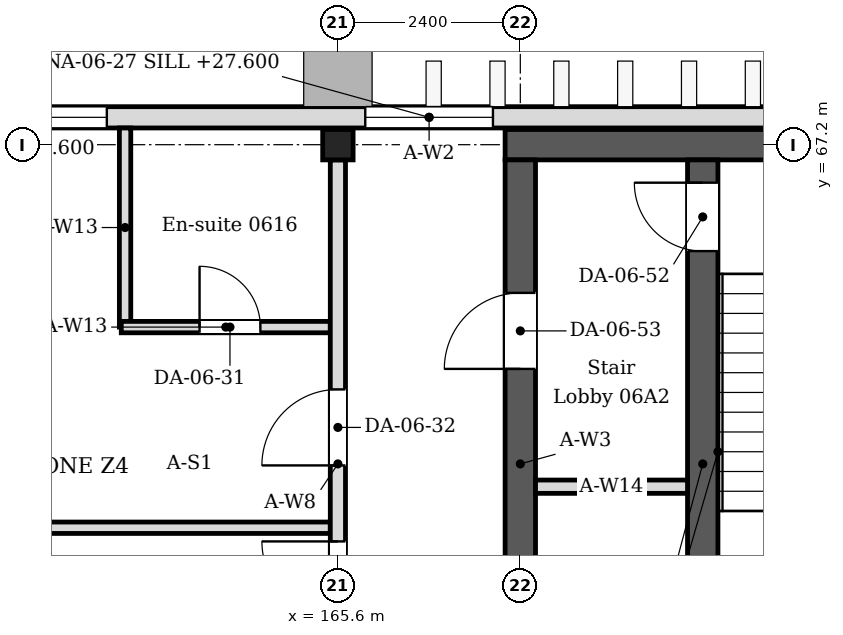
"""IFC4 building model, lengths in metres.
Left out: names, types, materials, properties, quantities, classifications, styles, units other than length and angle.
Written with IfcOpenShell. Run it as: python <this file> out.ifc"""

import sys

from ifc_helpers import new_model, si_unit, direction, frame, frame_2d, origin, origin_2d, place, context, subcontext, project, spatial, rectangle, i_section, extrude, element, fill, save


model = new_model("IFC4")
c1 = context("Model", 3, precision=1e-05, world=origin(), true_north=direction((0.0, 1.0)))
c2 = subcontext(c1, "Body", "Model", "MODEL_VIEW")
j1 = project(units=[si_unit("LENGTHUNIT", "METRE"), si_unit("PLANEANGLEUNIT", "RADIAN")], contexts=[c1])
p1 = place(None, origin())
s1 = spatial("IfcSite", under=j1, at=p1, CompositionType="ELEMENT")
p2 = place(p1, origin())
s2 = spatial("IfcBuilding", under=s1, at=p2, CompositionType="ELEMENT")
p3 = place(p2, frame((0.0, 0.0, 27.0)))
s3 = spatial("IfcBuildingStorey", under=s2, at=p3, CompositionType="ELEMENT", Elevation=27.0)
p4 = place(p3, frame((165.6, 67.2, 0.0), z_axis=(0.0, 0.0, 1.0), x_axis=(1.0, 0.0, 0.0)))
e1 = element("IfcColumn", 1, at=p4, inside=s3, PredefinedType="COLUMN", context=c2, shape_type="SweptSolid", body=[
    extrude(i_section(OverallWidth=0.4, OverallDepth=0.4, WebThickness=0.013, FlangeThickness=0.021, FilletRadius=0.022, at=origin_2d()), origin(), (0.0, 0.0, 1.0), 4.2),
])
p5 = place(p3, frame((167.8, 67.2, 0.0), z_axis=(0.0, 0.0, 1.0), x_axis=(1.0, 0.0, 0.0)))
e2 = element("IfcWall", 2, at=p5, inside=s3, PredefinedType="SOLIDWALL", context=c2, shape_type="SweptSolid", body=[
    extrude(rectangle(XDim=8.8, YDim=0.4, at=frame_2d((4.4, 0.0))), origin(), (0.0, 0.0, 1.0), 4.05),
])
p6 = place(p3, frame((168.0, 59.0, 0.0), z_axis=(0.0, 0.0, 1.0), x_axis=(0.0, 1.0, 0.0)))
e3 = element("IfcWall", 3, at=p6, inside=s3, PredefinedType="SOLIDWALL", context=c2, shape_type="SweptSolid", body=[
    extrude(rectangle(XDim=8.0, YDim=0.4, at=frame_2d((4.0, 0.0))), origin(), (0.0, 0.0, 1.0), 4.05),
])
p7 = place(p6, frame((5.25, 0.0, 0.0)))
e4 = element("IfcOpeningElement", 4, at=p7, cuts=e3, PredefinedType="OPENING", context=c2, shape_type="SweptSolid", body=[
    extrude(rectangle(XDim=1.0, YDim=2.1, at=frame_2d((0.5, 1.05))), frame((0.0, 0.21, 0.0), z_axis=(0.0, -1.0, 0.0), x_axis=(1.0, 0.0, 0.0)), (0.0, 0.0, 1.0), 0.42),
])
p8 = place(p6, frame((1.275, 0.0, 0.0)))
e5 = element("IfcOpeningElement", 5, at=p8, cuts=e3, PredefinedType="OPENING", context=c2, shape_type="SweptSolid", body=[
    extrude(rectangle(XDim=1.05, YDim=2.1, at=frame_2d((0.525, 1.05))), frame((0.0, 0.21, 0.0), z_axis=(0.0, -1.0, 0.0), x_axis=(1.0, 0.0, 0.0)), (0.0, 0.0, 1.0), 0.42),
])
p9 = place(p3, frame((156.7, 67.56, 0.0), z_axis=(0.0, 0.0, 1.0), x_axis=(1.0, 0.0, 0.0)))
e6 = element("IfcWall", 6, at=p9, inside=s3, PredefinedType="SOLIDWALL", context=c2, shape_type="SweptSolid", body=[
    extrude(rectangle(XDim=20.2, YDim=0.28, at=frame_2d((10.1, 0.0))), origin(), (0.0, 0.0, 1.0), 4.05),
])
p10 = place(p9, frame((9.26, 0.0, 0.6)))
e7 = element("IfcOpeningElement", 7, at=p10, cuts=e6, PredefinedType="OPENING", context=c2, shape_type="SweptSolid", body=[
    extrude(rectangle(XDim=1.68, YDim=2.4, at=frame_2d((0.84, 1.2))), frame((0.0, 0.15, 0.0), z_axis=(0.0, -1.0, 0.0), x_axis=(1.0, 0.0, 0.0)), (0.0, 0.0, 1.0), 0.3),
])
p11 = place(p9, frame((3.34, 0.0, 0.6)))
e8 = element("IfcOpeningElement", 8, at=p11, cuts=e6, PredefinedType="OPENING", context=c2, shape_type="SweptSolid", body=[
    extrude(rectangle(XDim=2.52, YDim=2.4, at=frame_2d((1.26, 1.2))), frame((0.0, 0.15, 0.0), z_axis=(0.0, -1.0, 0.0), x_axis=(1.0, 0.0, 0.0)), (0.0, 0.0, 1.0), 0.3),
])
p12 = place(p3, frame((162.8, 64.8, 0.0), z_axis=(0.0, 0.0, 1.0), x_axis=(0.0, 1.0, 0.0)))
e9 = element("IfcWall", 9, at=p12, inside=s3, PredefinedType="PARTITIONING", context=c2, shape_type="SweptSolid", body=[
    extrude(rectangle(XDim=2.62, YDim=0.15, at=frame_2d((1.31, 0.0))), origin(), (0.0, 0.0, 1.0), 4.05),
])
p13 = place(p3, frame((162.75, 64.8, 0.0), z_axis=(0.0, 0.0, 1.0), x_axis=(1.0, 0.0, 0.0)))
e10 = element("IfcWall", 10, at=p13, inside=s3, PredefinedType="PARTITIONING", context=c2, shape_type="SweptSolid", body=[
    extrude(rectangle(XDim=2.75, YDim=0.15, at=frame_2d((1.375, 0.0))), origin(), (0.0, 0.0, 1.0), 4.05),
])
p14 = place(p13, frame((1.03, 0.0, 0.0)))
e11 = element("IfcOpeningElement", 11, at=p14, cuts=e10, PredefinedType="OPENING", context=c2, shape_type="SweptSolid", body=[
    extrude(rectangle(XDim=0.8, YDim=2.1, at=frame_2d((0.4, 1.05))), frame((0.0, 0.085, 0.0), z_axis=(0.0, -1.0, 0.0), x_axis=(1.0, 0.0, 0.0)), (0.0, 0.0, 1.0), 0.17),
])
p15 = place(p3, frame((156.98, 62.16, 0.0), z_axis=(0.0, 0.0, 1.0), x_axis=(1.0, 0.0, 0.0)))
e12 = element("IfcWall", 12, at=p15, inside=s3, PredefinedType="PARTITIONING", context=c2, shape_type="SweptSolid", body=[
    extrude(rectangle(XDim=8.52, YDim=0.15, at=frame_2d((4.26, 0.0))), origin(), (0.0, 0.0, 1.0), 3.604),
])
p16 = place(p3, frame((165.6, 59.0, 0.0), z_axis=(0.0, 0.0, 1.0), x_axis=(0.0, 1.0, 0.0)))
e13 = element("IfcWall", 13, at=p16, inside=s3, PredefinedType="PARTITIONING", context=c2, shape_type="SweptSolid", body=[
    extrude(rectangle(XDim=8.0, YDim=0.2, at=frame_2d((4.0, 0.0))), origin(), (0.0, 0.0, 1.0), 3.45),
])
p17 = place(p16, frame((1.98, 0.0, 0.0)))
e14 = element("IfcOpeningElement", 14, at=p17, cuts=e13, PredefinedType="OPENING", context=c2, shape_type="SweptSolid", body=[
    extrude(rectangle(XDim=1.0, YDim=2.4, at=frame_2d((0.5, 1.2))), frame((0.0, 0.11, 0.0), z_axis=(0.0, -1.0, 0.0), x_axis=(1.0, 0.0, 0.0)), (0.0, 0.0, 1.0), 0.22),
])
p18 = place(p16, frame((3.98, 0.0, 0.0)))
e15 = element("IfcOpeningElement", 15, at=p18, cuts=e13, PredefinedType="OPENING", context=c2, shape_type="SweptSolid", body=[
    extrude(rectangle(XDim=1.0, YDim=2.4, at=frame_2d((0.5, 1.2))), frame((0.0, 0.11, 0.0), z_axis=(0.0, -1.0, 0.0), x_axis=(1.0, 0.0, 0.0)), (0.0, 0.0, 1.0), 0.22),
])
p19 = place(p3, frame((170.4, 59.0, 0.0), z_axis=(0.0, 0.0, 1.0), x_axis=(0.0, 1.0, 0.0)))
e16 = element("IfcWall", 16, at=p19, inside=s3, PredefinedType="SOLIDWALL", context=c2, shape_type="SweptSolid", body=[
    extrude(rectangle(XDim=8.0, YDim=0.4, at=frame_2d((4.0, 0.0))), origin(), (0.0, 0.0, 1.0), 4.05),
])
p20 = place(p19, frame((6.8, 0.0, 0.0)))
e17 = element("IfcOpeningElement", 17, at=p20, cuts=e16, PredefinedType="OPENING", context=c2, shape_type="SweptSolid", body=[
    extrude(rectangle(XDim=0.9, YDim=2.1, at=frame_2d((0.45, 1.05))), frame((0.0, 0.21, 0.0), z_axis=(0.0, -1.0, 0.0), x_axis=(1.0, 0.0, 0.0)), (0.0, 0.0, 1.0), 0.42),
])
p21 = place(p3, frame((168.2, 62.7, 0.0), z_axis=(0.0, 0.0, 1.0), x_axis=(1.0, 0.0, 0.0)))
e18 = element("IfcWall", 18, at=p21, inside=s3, PredefinedType="PARTITIONING", context=c2, shape_type="SweptSolid", body=[
    extrude(rectangle(XDim=2.0, YDim=0.175, at=frame_2d((1.0, 0.0))), origin(), (0.0, 0.0, 1.0), 4.05),
])
p22 = place(p10, origin())
e19 = element("IfcWindow", 19, at=p22, inside=s3, PartitioningType="SINGLE_PANEL", PredefinedType="WINDOW", context=c2, shape_type="SweptSolid", body=[
    extrude(rectangle(XDim=1.68, YDim=2.4, at=frame_2d((0.84, 1.2))), frame((0.0, 0.03, 0.0), z_axis=(0.0, -1.0, 0.0), x_axis=(1.0, 0.0, 0.0)), (0.0, 0.0, 1.0), 0.06),
])
fill(e7, e19)
p23 = place(p11, origin())
e20 = element("IfcWindow", 20, at=p23, inside=s3, PartitioningType="SINGLE_PANEL", PredefinedType="WINDOW", context=c2, shape_type="SweptSolid", body=[
    extrude(rectangle(XDim=2.52, YDim=2.4, at=frame_2d((1.26, 1.2))), frame((0.0, 0.03, 0.0), z_axis=(0.0, -1.0, 0.0), x_axis=(1.0, 0.0, 0.0)), (0.0, 0.0, 1.0), 0.06),
])
fill(e8, e20)
p24 = place(p17, origin())
e21 = element("IfcDoor", 21, at=p24, inside=s3, OperationType="SINGLE_SWING_RIGHT", PredefinedType="DOOR", context=c2, shape_type="SweptSolid", body=[
    extrude(rectangle(XDim=1.0, YDim=2.4, at=frame_2d((0.5, 1.2))), frame((0.0, 0.025, 0.0), z_axis=(0.0, -1.0, 0.0), x_axis=(1.0, 0.0, 0.0)), (0.0, 0.0, 1.0), 0.05),
])
fill(e14, e21)
p25 = place(p14, origin())
e22 = element("IfcDoor", 22, at=p25, inside=s3, OperationType="SINGLE_SWING_LEFT", PredefinedType="DOOR", context=c2, shape_type="SweptSolid", body=[
    extrude(rectangle(XDim=0.8, YDim=2.1, at=frame_2d((0.4, 1.05))), frame((0.0, 0.025, 0.0), z_axis=(0.0, -1.0, 0.0), x_axis=(1.0, 0.0, 0.0)), (0.0, 0.0, 1.0), 0.05),
])
fill(e11, e22)
p26 = place(p18, origin())
e23 = element("IfcDoor", 23, at=p26, inside=s3, OperationType="SINGLE_SWING_LEFT", PredefinedType="DOOR", context=c2, shape_type="SweptSolid", body=[
    extrude(rectangle(XDim=1.0, YDim=2.4, at=frame_2d((0.5, 1.2))), frame((0.0, 0.025, 0.0), z_axis=(0.0, -1.0, 0.0), x_axis=(1.0, 0.0, 0.0)), (0.0, 0.0, 1.0), 0.05),
])
fill(e15, e23)
p27 = place(p20, origin())
e24 = element("IfcDoor", 24, at=p27, inside=s3, OperationType="SINGLE_SWING_RIGHT", PredefinedType="DOOR", context=c2, shape_type="SweptSolid", body=[
    extrude(rectangle(XDim=0.9, YDim=2.1, at=frame_2d((0.45, 1.05))), frame((0.0, 0.025, 0.0), z_axis=(0.0, -1.0, 0.0), x_axis=(1.0, 0.0, 0.0)), (0.0, 0.0, 1.0), 0.05),
])
fill(e17, e24)
p28 = place(p7, origin())
e25 = element("IfcDoor", 25, at=p28, inside=s3, OperationType="SINGLE_SWING_LEFT", PredefinedType="DOOR", context=c2, shape_type="SweptSolid", body=[
    extrude(rectangle(XDim=1.0, YDim=2.1, at=frame_2d((0.5, 1.05))), frame((0.0, 0.025, 0.0), z_axis=(0.0, -1.0, 0.0), x_axis=(1.0, 0.0, 0.0)), (0.0, 0.0, 1.0), 0.05),
])
fill(e4, e25)
save(model, sys.argv[1])
